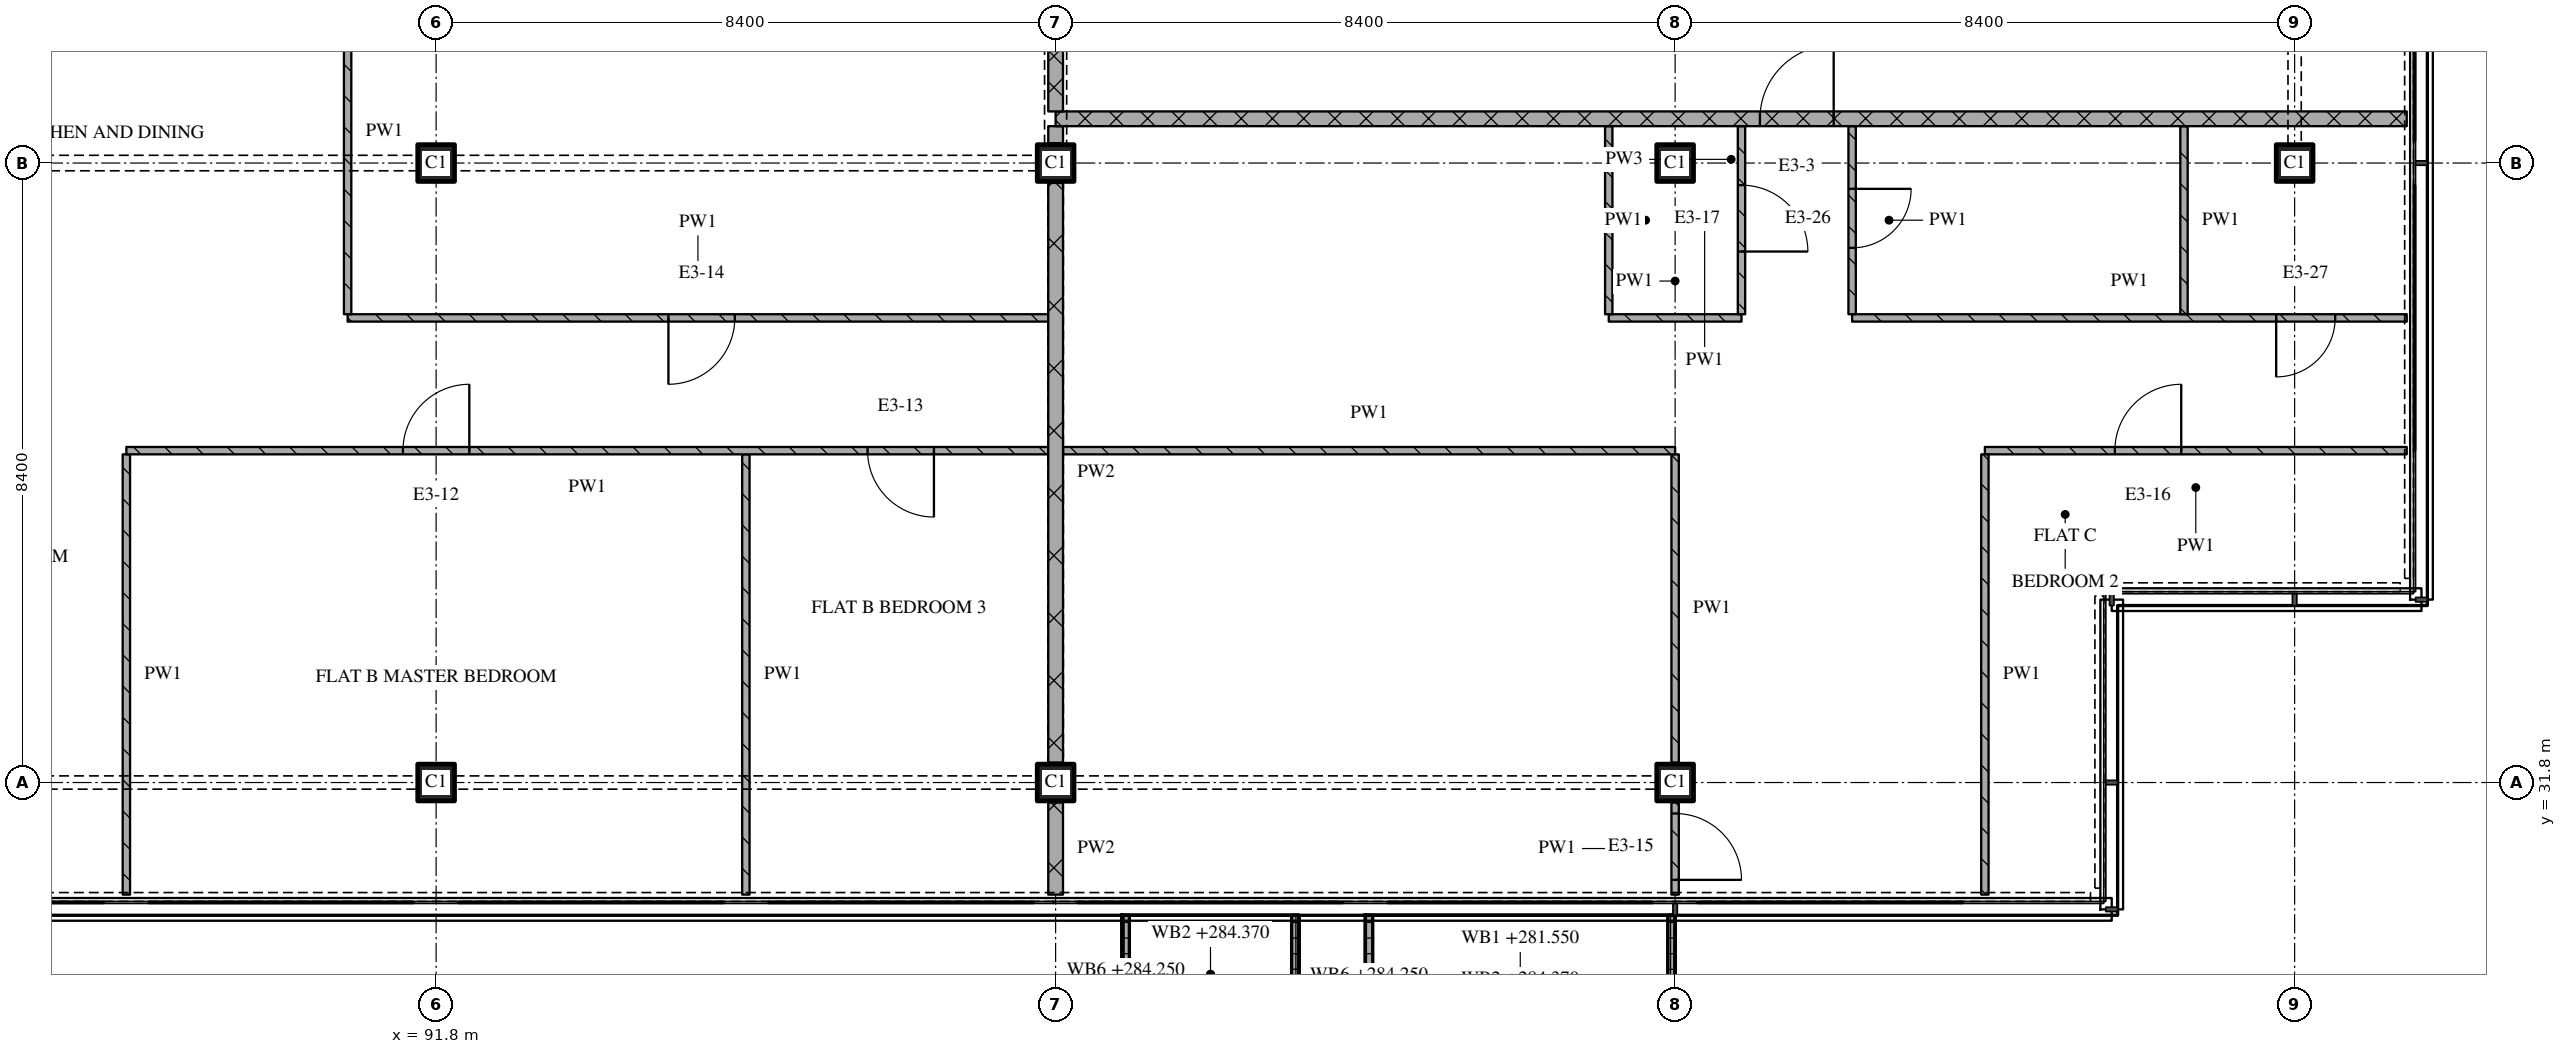
"""IFC4 building model, lengths in metres.
Left out: names, types, materials, properties, quantities, classifications, styles, units other than length and angle.
Written with IfcOpenShell. Run it as: python <this file> out.ifc"""

import sys

from ifc_helpers import new_model, si_unit, direction, frame, frame_2d, origin, origin_2d, place, context, subcontext, project, spatial, polyline, rectangle, outline, extrude, element, fill, save


model = new_model("IFC4")
c1 = context("Model", 3, precision=1e-05, world=origin(), true_north=direction((0.0, 1.0)))
c2 = subcontext(c1, "Body", "Model", "MODEL_VIEW")
j1 = project(units=[si_unit("LENGTHUNIT", "METRE"), si_unit("PLANEANGLEUNIT", "RADIAN")], contexts=[c1])
p1 = place(None, origin())
s1 = spatial("IfcSite", under=j1, at=p1, CompositionType="ELEMENT")
p2 = place(p1, origin())
s2 = spatial("IfcBuilding", under=s1, at=p2, CompositionType="ELEMENT")
p3 = place(p2, frame((0.0, 0.0, 281.55)))
s3 = spatial("IfcBuildingStorey", under=s2, at=p3, CompositionType="ELEMENT", Elevation=281.55)
for number, where, z_axis, x_axis in (
    (1, (91.8, 31.8, 0.0), (0.0, 0.0, 1.0), (1.0, 0.0, 0.0)),
    (2, (91.8, 40.2, 0.0), (0.0, 0.0, 1.0), (1.0, 0.0, 0.0)),
    (3, (100.2, 31.8, 0.0), (0.0, 0.0, 1.0), (1.0, 0.0, 0.0)),
    (4, (100.2, 40.2, 0.0), (0.0, 0.0, 1.0), (1.0, 0.0, 0.0)),
    (5, (108.6, 31.8, 0.0), (0.0, 0.0, 1.0), (1.0, 0.0, 0.0)),
    (6, (108.6, 40.2, 0.0), (0.0, 0.0, 1.0), (1.0, 0.0, 0.0)),
    (7, (117.0, 40.2, 0.0), (0.0, 0.0, 1.0), (1.0, 0.0, 0.0)),
):
    element("IfcColumn", number, at=place(p3, frame(where, z_axis=z_axis, x_axis=x_axis)), inside=s3, PredefinedType="COLUMN", context=c2, shape_type="SweptSolid", body=[
        extrude(rectangle(XDim=0.5, YDim=0.5, at=origin_2d()), origin(), (0.0, 0.0, 1.0), 3.6),
    ])
p4 = place(p3, origin())
e8 = element("IfcWall", 8, at=p4, inside=s3, PredefinedType="SOLIDWALL", context=c2, shape_type="SweptSolid", body=[
    extrude(outline(polyline([(101.1, 30.0), (101.2, 30.0), (101.2, 28.5), (103.4, 28.5), (103.4, 30.0), (103.5, 30.0), (103.5, 28.4), (101.1, 28.4), (101.1, 30.0)])), origin(), (0.0, 0.0, 1.0), 1.0),
])
p5 = place(p3, origin())
e9 = element("IfcWall", 9, at=p5, inside=s3, PredefinedType="SOLIDWALL", context=c2, shape_type="SweptSolid", body=[
    extrude(outline(polyline([(104.4, 30.0), (104.5, 30.0), (104.5, 28.367), (108.5, 28.367), (108.5, 30.0), (108.6, 30.0), (108.6, 28.267), (104.4, 28.267), (104.4, 30.0)])), origin(), (0.0, 0.0, 1.0), 1.0),
])
p6 = place(p3, frame((118.52, 36.3, 0.0), z_axis=(0.0, 0.0, 1.0), x_axis=(-1.0, 0.0, 0.0)))
e10 = element("IfcWall", 10, at=p6, inside=s3, PredefinedType="PARTITIONING", context=c2, shape_type="SweptSolid", body=[
    extrude(rectangle(XDim=5.72, YDim=0.1, at=frame_2d((2.86, 0.0))), origin(), (0.0, 0.0, 1.0), 3.32),
])
p7 = place(p6, frame((3.058, 0.0, 0.0)))
e11 = element("IfcOpeningElement", 11, at=p7, cuts=e10, PredefinedType="OPENING", context=c2, shape_type="SweptSolid", body=[
    extrude(rectangle(XDim=0.9, YDim=2.1, at=frame_2d((0.45, 1.05))), frame((0.0, 0.06, 0.0), z_axis=(0.0, -1.0, 0.0), x_axis=(1.0, 0.0, 0.0)), (0.0, 0.0, 1.0), 0.12),
])
p8 = place(p3, frame((90.6, 38.1, 0.0), z_axis=(0.0, 0.0, 1.0), x_axis=(1.0, 0.0, 0.0)))
e12 = element("IfcWall", 12, at=p8, inside=s3, PredefinedType="PARTITIONING", context=c2, shape_type="SweptSolid", body=[
    extrude(rectangle(XDim=9.5, YDim=0.1, at=frame_2d((4.75, 0.0))), origin(), (0.0, 0.0, 1.0), 3.32),
])
p9 = place(p8, frame((4.35, 0.0, 0.0)))
e13 = element("IfcOpeningElement", 13, at=p9, cuts=e12, PredefinedType="OPENING", context=c2, shape_type="SweptSolid", body=[
    extrude(rectangle(XDim=0.9, YDim=2.1, at=frame_2d((0.45, 1.05))), frame((0.0, 0.06, 0.0), z_axis=(0.0, -1.0, 0.0), x_axis=(1.0, 0.0, 0.0)), (0.0, 0.0, 1.0), 0.12),
])
p10 = place(p3, frame((107.7, 38.1, 0.0), z_axis=(0.0, 0.0, 1.0), x_axis=(1.0, 0.0, 0.0)))
e14 = element("IfcWall", 14, at=p10, inside=s3, PredefinedType="PARTITIONING", context=c2, shape_type="SweptSolid", body=[
    extrude(rectangle(XDim=1.8, YDim=0.1, at=frame_2d((0.9, 0.0))), origin(), (0.0, 0.0, 1.0), 3.32),
])
p11 = place(p3, frame((111.0, 38.1, 0.0), z_axis=(0.0, 0.0, 1.0), x_axis=(1.0, 0.0, 0.0)))
e15 = element("IfcWall", 15, at=p11, inside=s3, PredefinedType="PARTITIONING", context=c2, shape_type="SweptSolid", body=[
    extrude(rectangle(XDim=7.52, YDim=0.1, at=frame_2d((3.76, 0.0))), origin(), (0.0, 0.0, 1.0), 3.32),
])
p12 = place(p11, frame((5.75, 0.0, 0.0)))
e16 = element("IfcOpeningElement", 16, at=p12, cuts=e15, PredefinedType="OPENING", context=c2, shape_type="SweptSolid", body=[
    extrude(rectangle(XDim=0.8, YDim=2.1, at=frame_2d((0.4, 1.05))), frame((0.0, 0.06, 0.0), z_axis=(0.0, -1.0, 0.0), x_axis=(1.0, 0.0, 0.0)), (0.0, 0.0, 1.0), 0.12),
])
p13 = place(p3, frame((118.52, 40.8, 0.0), z_axis=(0.0, 0.0, 1.0), x_axis=(-1.0, 0.0, 0.0)))
e17 = element("IfcWall", 17, at=p13, inside=s3, PredefinedType="PARTITIONING", context=c2, shape_type="SweptSolid", body=[
    extrude(rectangle(XDim=18.32, YDim=0.2, at=frame_2d((9.16, 0.0))), origin(), (0.0, 0.0, 1.0), 3.32),
])
p14 = place(p13, frame((7.77, 0.0, 0.0)))
e18 = element("IfcOpeningElement", 18, at=p14, cuts=e17, PredefinedType="OPENING", context=c2, shape_type="SweptSolid", body=[
    extrude(rectangle(XDim=1.0, YDim=2.1, at=frame_2d((0.5, 1.05))), frame((0.0, 0.11, 0.0), z_axis=(0.0, -1.0, 0.0), x_axis=(1.0, 0.0, 0.0)), (0.0, 0.0, 1.0), 0.22),
])
p15 = place(p3, frame((87.6, 36.25, 0.0), z_axis=(0.0, 0.0, 1.0), x_axis=(0.0, -1.0, 0.0)))
e19 = element("IfcWall", 19, at=p15, inside=s3, PredefinedType="PARTITIONING", context=c2, shape_type="SweptSolid", body=[
    extrude(rectangle(XDim=5.97, YDim=0.1, at=frame_2d((2.985, 0.0))), origin(), (0.0, 0.0, 1.0), 3.32),
])
p16 = place(p3, frame((90.6, 43.1, 0.0), z_axis=(0.0, 0.0, 1.0), x_axis=(0.0, -1.0, 0.0)))
e20 = element("IfcWall", 20, at=p16, inside=s3, PredefinedType="PARTITIONING", context=c2, shape_type="SweptSolid", body=[
    extrude(rectangle(XDim=4.95, YDim=0.1, at=frame_2d((2.475, 0.0))), origin(), (0.0, 0.0, 1.0), 3.32),
])
p17 = place(p3, frame((96.0, 36.25, 0.0), z_axis=(0.0, 0.0, 1.0), x_axis=(0.0, -1.0, 0.0)))
e21 = element("IfcWall", 21, at=p17, inside=s3, PredefinedType="PARTITIONING", context=c2, shape_type="SweptSolid", body=[
    extrude(rectangle(XDim=5.97, YDim=0.1, at=frame_2d((2.985, 0.0))), origin(), (0.0, 0.0, 1.0), 3.32),
])
p18 = place(p3, frame((100.2, 43.1, 0.0), z_axis=(0.0, 0.0, 1.0), x_axis=(0.0, -1.0, 0.0)))
e22 = element("IfcWall", 22, at=p18, inside=s3, PredefinedType="PARTITIONING", context=c2, shape_type="SweptSolid", body=[
    extrude(rectangle(XDim=2.2, YDim=0.2, at=frame_2d((1.1, 0.0))), origin(), (0.0, 0.0, 1.0), 2.53),
])
p19 = place(p3, frame((100.2, 31.53, 0.0), z_axis=(0.0, 0.0, 1.0), x_axis=(0.0, -1.0, 0.0)))
e23 = element("IfcWall", 23, at=p19, inside=s3, PredefinedType="PARTITIONING", context=c2, shape_type="SweptSolid", body=[
    extrude(rectangle(XDim=1.25, YDim=0.2, at=frame_2d((0.625, 0.0))), origin(), (0.0, 0.0, 1.0), 3.32),
])
p20 = place(p3, frame((100.2, 39.93, 0.0), z_axis=(0.0, 0.0, 1.0), x_axis=(0.0, -1.0, 0.0)))
e24 = element("IfcWall", 24, at=p20, inside=s3, PredefinedType="PARTITIONING", context=c2, shape_type="SweptSolid", body=[
    extrude(rectangle(XDim=7.86, YDim=0.2, at=frame_2d((3.93, 0.0))), origin(), (0.0, 0.0, 1.0), 2.83),
])
p21 = place(p3, frame((100.2, 40.7, 0.0), z_axis=(0.0, 0.0, 1.0), x_axis=(0.0, -1.0, 0.0)))
e25 = element("IfcWall", 25, at=p21, inside=s3, PredefinedType="PARTITIONING", context=c2, shape_type="SweptSolid", body=[
    extrude(rectangle(XDim=0.23, YDim=0.2, at=frame_2d((0.115, 0.0))), origin(), (0.0, 0.0, 1.0), 3.32),
])
p22 = place(p3, frame((107.7, 40.7, 0.0), z_axis=(0.0, 0.0, 1.0), x_axis=(0.0, -1.0, 0.0)))
e26 = element("IfcWall", 26, at=p22, inside=s3, PredefinedType="PARTITIONING", context=c2, shape_type="SweptSolid", body=[
    extrude(rectangle(XDim=2.55, YDim=0.1, at=frame_2d((1.275, 0.0))), origin(), (0.0, 0.0, 1.0), 3.32),
])
p23 = place(p3, frame((108.6, 30.28, 0.0), z_axis=(0.0, 0.0, 1.0), x_axis=(0.0, 1.0, 0.0)))
e27 = element("IfcWall", 27, at=p23, inside=s3, PredefinedType="PARTITIONING", context=c2, shape_type="SweptSolid", body=[
    extrude(rectangle(XDim=1.25, YDim=0.1, at=frame_2d((0.625, 0.0))), origin(), (0.0, 0.0, 1.0), 3.32),
])
p24 = place(p23, frame((0.2, 0.0, 0.0)))
e28 = element("IfcOpeningElement", 28, at=p24, cuts=e27, PredefinedType="OPENING", context=c2, shape_type="SweptSolid", body=[
    extrude(rectangle(XDim=0.9, YDim=2.1, at=frame_2d((0.45, 1.05))), frame((0.0, 0.06, 0.0), z_axis=(0.0, -1.0, 0.0), x_axis=(1.0, 0.0, 0.0)), (0.0, 0.0, 1.0), 0.12),
])
p25 = place(p3, frame((108.6, 36.25, 0.0), z_axis=(0.0, 0.0, 1.0), x_axis=(0.0, -1.0, 0.0)))
e29 = element("IfcWall", 29, at=p25, inside=s3, PredefinedType="PARTITIONING", context=c2, shape_type="SweptSolid", body=[
    extrude(rectangle(XDim=4.18, YDim=0.1, at=frame_2d((2.09, 0.0))), origin(), (0.0, 0.0, 1.0), 2.83),
])
p26 = place(p3, frame((109.5, 38.15, 0.0), z_axis=(0.0, 0.0, 1.0), x_axis=(0.0, 1.0, 0.0)))
e30 = element("IfcWall", 30, at=p26, inside=s3, PredefinedType="PARTITIONING", context=c2, shape_type="SweptSolid", body=[
    extrude(rectangle(XDim=2.55, YDim=0.1, at=frame_2d((1.275, 0.0))), origin(), (0.0, 0.0, 1.0), 3.32),
])
p27 = place(p26, frame((0.85, 0.0, 0.0)))
e31 = element("IfcOpeningElement", 31, at=p27, cuts=e30, PredefinedType="OPENING", context=c2, shape_type="SweptSolid", body=[
    extrude(rectangle(XDim=0.9, YDim=2.1, at=frame_2d((0.45, 1.05))), frame((0.0, 0.06, 0.0), z_axis=(0.0, -1.0, 0.0), x_axis=(1.0, 0.0, 0.0)), (0.0, 0.0, 1.0), 0.12),
])
p28 = place(p3, frame((111.0, 40.7, 0.0), z_axis=(0.0, 0.0, 1.0), x_axis=(0.0, -1.0, 0.0)))
e32 = element("IfcWall", 32, at=p28, inside=s3, PredefinedType="PARTITIONING", context=c2, shape_type="SweptSolid", body=[
    extrude(rectangle(XDim=2.55, YDim=0.1, at=frame_2d((1.275, 0.0))), origin(), (0.0, 0.0, 1.0), 3.32),
])
p29 = place(p28, frame((0.85, 0.0, 0.0)))
e33 = element("IfcOpeningElement", 33, at=p29, cuts=e32, PredefinedType="OPENING", context=c2, shape_type="SweptSolid", body=[
    extrude(rectangle(XDim=0.8, YDim=2.1, at=frame_2d((0.4, 1.05))), frame((0.0, 0.06, 0.0), z_axis=(0.0, -1.0, 0.0), x_axis=(1.0, 0.0, 0.0)), (0.0, 0.0, 1.0), 0.12),
])
p30 = place(p3, frame((112.8, 36.25, 0.0), z_axis=(0.0, 0.0, 1.0), x_axis=(0.0, -1.0, 0.0)))
e34 = element("IfcWall", 34, at=p30, inside=s3, PredefinedType="PARTITIONING", context=c2, shape_type="SweptSolid", body=[
    extrude(rectangle(XDim=5.97, YDim=0.1, at=frame_2d((2.985, 0.0))), origin(), (0.0, 0.0, 1.0), 3.32),
])
p31 = place(p3, frame((115.5, 40.7, 0.0), z_axis=(0.0, 0.0, 1.0), x_axis=(0.0, -1.0, 0.0)))
e35 = element("IfcWall", 35, at=p31, inside=s3, PredefinedType="PARTITIONING", context=c2, shape_type="SweptSolid", body=[
    extrude(rectangle(XDim=2.55, YDim=0.1, at=frame_2d((1.275, 0.0))), origin(), (0.0, 0.0, 1.0), 3.32),
])
p32 = place(p3, frame((100.1, 36.3, 0.0), z_axis=(0.0, 0.0, 1.0), x_axis=(-1.0, 0.0, 0.0)))
e36 = element("IfcWall", 36, at=p32, inside=s3, PredefinedType="PARTITIONING", context=c2, shape_type="SweptSolid", body=[
    extrude(rectangle(XDim=12.5, YDim=0.1, at=frame_2d((6.25, 0.0))), origin(), (0.0, 0.0, 1.0), 3.32),
])
p33 = place(p32, frame((1.55, 0.0, 0.0)))
e37 = element("IfcOpeningElement", 37, at=p33, cuts=e36, PredefinedType="OPENING", context=c2, shape_type="SweptSolid", body=[
    extrude(rectangle(XDim=0.9, YDim=2.1, at=frame_2d((0.45, 1.05))), frame((0.0, 0.06, 0.0), z_axis=(0.0, -1.0, 0.0), x_axis=(1.0, 0.0, 0.0)), (0.0, 0.0, 1.0), 0.12),
])
p34 = place(p32, frame((7.85, 0.0, 0.0)))
e38 = element("IfcOpeningElement", 38, at=p34, cuts=e36, PredefinedType="OPENING", context=c2, shape_type="SweptSolid", body=[
    extrude(rectangle(XDim=0.9, YDim=2.1, at=frame_2d((0.45, 1.05))), frame((0.0, 0.06, 0.0), z_axis=(0.0, -1.0, 0.0), x_axis=(1.0, 0.0, 0.0)), (0.0, 0.0, 1.0), 0.12),
])
p35 = place(p3, frame((100.3, 36.3, 0.0), z_axis=(0.0, 0.0, 1.0), x_axis=(1.0, 0.0, 0.0)))
e39 = element("IfcWall", 39, at=p35, inside=s3, PredefinedType="PARTITIONING", context=c2, shape_type="SweptSolid", body=[
    extrude(rectangle(XDim=8.3, YDim=0.1, at=frame_2d((4.15, 0.0))), origin(), (0.0, 0.0, 1.0), 3.32),
])
p36 = place(p7, origin())
e40 = element("IfcDoor", 40, at=p36, inside=s3, OperationType="SINGLE_SWING_RIGHT", PredefinedType="DOOR", context=c2, shape_type="SweptSolid", body=[
    extrude(rectangle(XDim=0.9, YDim=2.1, at=frame_2d((0.45, 1.05))), frame((0.0, 0.025, 0.0), z_axis=(0.0, -1.0, 0.0), x_axis=(1.0, 0.0, 0.0)), (0.0, 0.0, 1.0), 0.05),
])
fill(e11, e40)
p37 = place(p9, origin())
e41 = element("IfcDoor", 41, at=p37, inside=s3, OperationType="SINGLE_SWING_RIGHT", PredefinedType="DOOR", context=c2, shape_type="SweptSolid", body=[
    extrude(rectangle(XDim=0.9, YDim=2.1, at=frame_2d((0.45, 1.05))), frame((0.0, 0.025, 0.0), z_axis=(0.0, -1.0, 0.0), x_axis=(1.0, 0.0, 0.0)), (0.0, 0.0, 1.0), 0.05),
])
fill(e13, e41)
p38 = place(p12, origin())
e42 = element("IfcDoor", 42, at=p38, inside=s3, OperationType="SINGLE_SWING_RIGHT", PredefinedType="DOOR", context=c2, shape_type="SweptSolid", body=[
    extrude(rectangle(XDim=0.8, YDim=2.1, at=frame_2d((0.4, 1.05))), frame((0.0, 0.025, 0.0), z_axis=(0.0, -1.0, 0.0), x_axis=(1.0, 0.0, 0.0)), (0.0, 0.0, 1.0), 0.05),
])
fill(e16, e42)
p39 = place(p14, origin())
e43 = element("IfcDoor", 43, at=p39, inside=s3, OperationType="SINGLE_SWING_RIGHT", PredefinedType="DOOR", context=c2, shape_type="SweptSolid", body=[
    extrude(rectangle(XDim=1.0, YDim=2.1, at=frame_2d((0.5, 1.05))), frame((0.0, 0.025, 0.0), z_axis=(0.0, -1.0, 0.0), x_axis=(1.0, 0.0, 0.0)), (0.0, 0.0, 1.0), 0.05),
])
fill(e18, e43)
p40 = place(p24, origin())
e44 = element("IfcDoor", 44, at=p40, inside=s3, OperationType="SINGLE_SWING_RIGHT", PredefinedType="DOOR", context=c2, shape_type="SweptSolid", body=[
    extrude(rectangle(XDim=0.9, YDim=2.1, at=frame_2d((0.45, 1.05))), frame((0.0, 0.025, 0.0), z_axis=(0.0, -1.0, 0.0), x_axis=(1.0, 0.0, 0.0)), (0.0, 0.0, 1.0), 0.05),
])
fill(e28, e44)
p41 = place(p27, origin())
e45 = element("IfcDoor", 45, at=p41, inside=s3, OperationType="SINGLE_SWING_RIGHT", PredefinedType="DOOR", context=c2, shape_type="SweptSolid", body=[
    extrude(rectangle(XDim=0.9, YDim=2.1, at=frame_2d((0.45, 1.05))), frame((0.0, 0.025, 0.0), z_axis=(0.0, -1.0, 0.0), x_axis=(1.0, 0.0, 0.0)), (0.0, 0.0, 1.0), 0.05),
])
fill(e31, e45)
p42 = place(p29, origin())
e46 = element("IfcDoor", 46, at=p42, inside=s3, OperationType="SINGLE_SWING_LEFT", PredefinedType="DOOR", context=c2, shape_type="SweptSolid", body=[
    extrude(rectangle(XDim=0.8, YDim=2.1, at=frame_2d((0.4, 1.05))), frame((0.0, 0.025, 0.0), z_axis=(0.0, -1.0, 0.0), x_axis=(1.0, 0.0, 0.0)), (0.0, 0.0, 1.0), 0.05),
])
fill(e33, e46)
p43 = place(p33, origin())
e47 = element("IfcDoor", 47, at=p43, inside=s3, OperationType="SINGLE_SWING_LEFT", PredefinedType="DOOR", context=c2, shape_type="SweptSolid", body=[
    extrude(rectangle(XDim=0.9, YDim=2.1, at=frame_2d((0.45, 1.05))), frame((0.0, 0.025, 0.0), z_axis=(0.0, -1.0, 0.0), x_axis=(1.0, 0.0, 0.0)), (0.0, 0.0, 1.0), 0.05),
])
fill(e37, e47)
p44 = place(p34, origin())
e48 = element("IfcDoor", 48, at=p44, inside=s3, OperationType="SINGLE_SWING_RIGHT", PredefinedType="DOOR", context=c2, shape_type="SweptSolid", body=[
    extrude(rectangle(XDim=0.9, YDim=2.1, at=frame_2d((0.45, 1.05))), frame((0.0, 0.025, 0.0), z_axis=(0.0, -1.0, 0.0), x_axis=(1.0, 0.0, 0.0)), (0.0, 0.0, 1.0), 0.05),
])
fill(e38, e48)
save(model, sys.argv[1])
